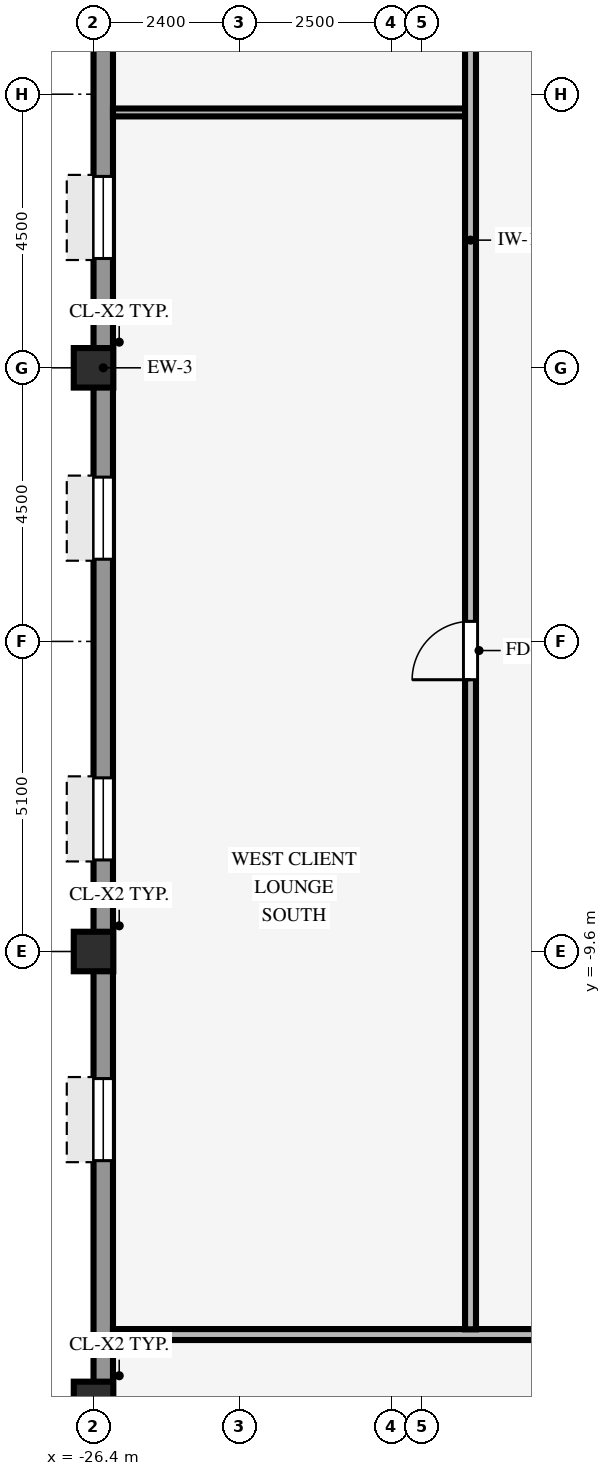
"""IFC4 building model, lengths in metres.
Left out: names, types, materials, properties, quantities, classifications, styles, units other than length and angle.
Written with IfcOpenShell. Run it as: python <this file> out.ifc"""

import sys

from ifc_helpers import new_model, si_unit, direction, frame, frame_2d, origin, origin_2d, place, context, subcontext, project, spatial, rectangle, hollow_rectangle, extrude, source, transform, mapped, element, fill, save


model = new_model("IFC4")
c1 = context("Model", 3, precision=1e-05, world=origin(), true_north=direction((0.0, 1.0)))
c2 = subcontext(c1, "Body", "Model", "MODEL_VIEW")
j1 = project(units=[si_unit("LENGTHUNIT", "METRE"), si_unit("PLANEANGLEUNIT", "RADIAN")], contexts=[c1])
p1 = place(None, origin())
s1 = spatial("IfcSite", under=j1, at=p1, CompositionType="ELEMENT")
p2 = place(p1, origin())
s2 = spatial("IfcBuilding", under=s1, at=p2, CompositionType="ELEMENT")
p3 = place(p2, frame((0.0, 0.0, 142.1)))
s3 = spatial("IfcBuildingStorey", under=s2, at=p3, CompositionType="ELEMENT", Elevation=142.1)
for number, where, z_axis, x_axis in (
    (1, (-26.4, -17.0, 0.0), (0.0, 0.0, 1.0), (1.0, 0.0, 0.0)),
    (2, (-26.4, -9.6, 0.0), (0.0, 0.0, 1.0), (1.0, 0.0, 0.0)),
    (3, (-26.4, 0.0, 0.0), (0.0, 0.0, 1.0), (1.0, 0.0, 0.0)),
):
    element("IfcColumn", number, at=place(p3, frame(where, z_axis=z_axis, x_axis=x_axis)), inside=s3, PredefinedType="COLUMN", context=c2, shape_type="SweptSolid", body=[
        extrude(hollow_rectangle(XDim=0.65, YDim=0.65, WallThickness=0.04, InnerFilletRadius=0.04, OuterFilletRadius=0.08, at=origin_2d()), origin(), (0.0, 0.0, 1.0), 3.37),
    ])
p4 = place(p3, frame((-26.24, -20.784, 0.0), z_axis=(0.0, 0.0, 1.0), x_axis=(0.0, 1.0, 0.0)))
e4 = element("IfcWall", 4, at=p4, inside=s3, PredefinedType="STANDARD", context=c2, shape_type="SweptSolid", body=[
    extrude(rectangle(XDim=41.568, YDim=0.32, at=frame_2d((20.784, 0.0))), origin(), (0.0, 0.0, 1.0), 2.705),
])
p5 = place(p4, frame((1.448, 0.0, 0.8)))
e5 = element("IfcOpeningElement", 5, at=p5, cuts=e4, PredefinedType="OPENING", context=c2, shape_type="SweptSolid", body=[
    extrude(rectangle(XDim=1.35, YDim=1.56, at=frame_2d((0.675, 0.78))), frame((0.0, 0.17, 0.0), z_axis=(0.0, -1.0, 0.0), x_axis=(1.0, 0.0, 0.0)), (0.0, 0.0, 1.0), 0.34),
])
p6 = place(p4, frame((7.744, 0.0, 0.8)))
e6 = element("IfcOpeningElement", 6, at=p6, cuts=e4, PredefinedType="OPENING", context=c2, shape_type="SweptSolid", body=[
    extrude(rectangle(XDim=1.35, YDim=1.56, at=frame_2d((0.675, 0.78))), frame((0.0, 0.17, 0.0), z_axis=(0.0, -1.0, 0.0), x_axis=(1.0, 0.0, 0.0)), (0.0, 0.0, 1.0), 0.34),
])
p7 = place(p4, frame((12.69, 0.0, 0.8)))
e7 = element("IfcOpeningElement", 7, at=p7, cuts=e4, PredefinedType="OPENING", context=c2, shape_type="SweptSolid", body=[
    extrude(rectangle(XDim=1.35, YDim=1.56, at=frame_2d((0.675, 0.78))), frame((0.0, 0.17, 0.0), z_axis=(0.0, -1.0, 0.0), x_axis=(1.0, 0.0, 0.0)), (0.0, 0.0, 1.0), 0.34),
])
p8 = place(p4, frame((17.636, 0.0, 0.8)))
e8 = element("IfcOpeningElement", 8, at=p8, cuts=e4, PredefinedType="OPENING", context=c2, shape_type="SweptSolid", body=[
    extrude(rectangle(XDim=1.35, YDim=1.56, at=frame_2d((0.675, 0.78))), frame((0.0, 0.17, 0.0), z_axis=(0.0, -1.0, 0.0), x_axis=(1.0, 0.0, 0.0)), (0.0, 0.0, 1.0), 0.34),
])
p9 = place(p4, frame((22.582, 0.0, 0.8)))
e9 = element("IfcOpeningElement", 9, at=p9, cuts=e4, PredefinedType="OPENING", context=c2, shape_type="SweptSolid", body=[
    extrude(rectangle(XDim=1.35, YDim=1.56, at=frame_2d((0.675, 0.78))), frame((0.0, 0.17, 0.0), z_axis=(0.0, -1.0, 0.0), x_axis=(1.0, 0.0, 0.0)), (0.0, 0.0, 1.0), 0.34),
])
p10 = place(p4, frame((27.528, 0.0, 0.8)))
e10 = element("IfcOpeningElement", 10, at=p10, cuts=e4, PredefinedType="OPENING", context=c2, shape_type="SweptSolid", body=[
    extrude(rectangle(XDim=1.35, YDim=1.56, at=frame_2d((0.675, 0.78))), frame((0.0, 0.17, 0.0), z_axis=(0.0, -1.0, 0.0), x_axis=(1.0, 0.0, 0.0)), (0.0, 0.0, 1.0), 0.34),
])
p11 = place(p4, frame((32.474, 0.0, 0.8)))
e11 = element("IfcOpeningElement", 11, at=p11, cuts=e4, PredefinedType="OPENING", context=c2, shape_type="SweptSolid", body=[
    extrude(rectangle(XDim=1.35, YDim=1.56, at=frame_2d((0.675, 0.78))), frame((0.0, 0.17, 0.0), z_axis=(0.0, -1.0, 0.0), x_axis=(1.0, 0.0, 0.0)), (0.0, 0.0, 1.0), 0.34),
])
p12 = place(p4, frame((38.77, 0.0, 0.8)))
e12 = element("IfcOpeningElement", 12, at=p12, cuts=e4, PredefinedType="OPENING", context=c2, shape_type="SweptSolid", body=[
    extrude(rectangle(XDim=1.35, YDim=1.56, at=frame_2d((0.675, 0.78))), frame((0.0, 0.17, 0.0), z_axis=(0.0, -1.0, 0.0), x_axis=(1.0, 0.0, 0.0)), (0.0, 0.0, 1.0), 0.34),
])
p13 = place(p3, frame((-26.08, -15.9, 0.0), z_axis=(0.0, 0.0, 1.0), x_axis=(1.0, 0.0, 0.0)))
e13 = element("IfcWall", 13, at=p13, inside=s3, PredefinedType="PARTITIONING", context=c2, shape_type="SweptSolid", body=[
    extrude(rectangle(XDim=52.16, YDim=0.18, at=frame_2d((26.08, 0.0))), origin(), (0.0, 0.0, 1.0), 3.36),
])
p14 = place(p13, frame((18.3, 0.0, 0.0)))
e14 = element("IfcOpeningElement", 14, at=p14, cuts=e13, PredefinedType="OPENING", context=c2, shape_type="SweptSolid", body=[
    extrude(rectangle(XDim=0.96, YDim=2.1, at=frame_2d((0.48, 1.05))), frame((0.0, 0.1, 0.0), z_axis=(0.0, -1.0, 0.0), x_axis=(1.0, 0.0, 0.0)), (0.0, 0.0, 1.0), 0.2),
])
p15 = place(p13, frame((40.5, 0.0, 0.0)))
e15 = element("IfcOpeningElement", 15, at=p15, cuts=e13, PredefinedType="OPENING", context=c2, shape_type="SweptSolid", body=[
    extrude(rectangle(XDim=0.96, YDim=2.1, at=frame_2d((0.48, 1.05))), frame((0.0, 0.1, 0.0), z_axis=(0.0, -1.0, 0.0), x_axis=(1.0, 0.0, 0.0)), (0.0, 0.0, 1.0), 0.2),
])
p16 = place(p3, frame((-26.08, 4.2, 0.0), z_axis=(0.0, 0.0, 1.0), x_axis=(1.0, 0.0, 0.0)))
e16 = element("IfcWall", 16, at=p16, inside=s3, PredefinedType="PARTITIONING", context=c2, shape_type="SweptSolid", body=[
    extrude(rectangle(XDim=5.794, YDim=0.13, at=frame_2d((2.897, 0.0))), origin(), (0.0, 0.0, 1.0), 3.36),
])
p17 = place(p3, frame((-20.2, -15.814, 0.0), z_axis=(0.0, 0.0, 1.0), x_axis=(0.0, 1.0, 0.0)))
e17 = element("IfcWall", 17, at=p17, inside=s3, PredefinedType="PARTITIONING", context=c2, shape_type="SweptSolid", body=[
    extrude(rectangle(XDim=31.628, YDim=0.18, at=frame_2d((15.814, 0.0))), origin(), (0.0, 0.0, 1.0), 3.36),
])
p18 = place(p17, frame((10.684, 0.0, 0.0)))
e18 = element("IfcOpeningElement", 18, at=p18, cuts=e17, PredefinedType="OPENING", context=c2, shape_type="SweptSolid", body=[
    extrude(rectangle(XDim=0.96, YDim=2.1, at=frame_2d((0.48, 1.05))), frame((0.0, 0.1, 0.0), z_axis=(0.0, -1.0, 0.0), x_axis=(1.0, 0.0, 0.0)), (0.0, 0.0, 1.0), 0.2),
])
p19 = place(p17, frame((24.184, 0.0, 0.0)))
e19 = element("IfcOpeningElement", 19, at=p19, cuts=e17, PredefinedType="OPENING", context=c2, shape_type="SweptSolid", body=[
    extrude(rectangle(XDim=0.96, YDim=2.1, at=frame_2d((0.48, 1.05))), frame((0.0, 0.1, 0.0), z_axis=(0.0, -1.0, 0.0), x_axis=(1.0, 0.0, 0.0)), (0.0, 0.0, 1.0), 0.2),
])
m1 = source(origin(), c2, "Body", "SweptSolid", [
    extrude(rectangle(XDim=1.35, YDim=1.56, at=frame_2d((0.675, 0.78))), frame((0.0, 0.03, 0.0), z_axis=(0.0, -1.0, 0.0), x_axis=(1.0, 0.0, 0.0)), (0.0, 0.0, 1.0), 0.06),
])
p20 = place(p6, origin())
e20 = element("IfcWindow", 20, at=p20, inside=s3, PartitioningType="SINGLE_PANEL", PredefinedType="WINDOW", context=c2, shape_type="MappedRepresentation", body=[
    mapped(m1, transform((0.0, 0.0, 0.0), scale=1.0)),
])
fill(e6, e20)
p21 = place(p7, origin())
e21 = element("IfcWindow", 21, at=p21, inside=s3, PartitioningType="SINGLE_PANEL", PredefinedType="WINDOW", context=c2, shape_type="MappedRepresentation", body=[
    mapped(m1, transform((0.0, 0.0, 0.0), scale=1.0)),
])
fill(e7, e21)
p22 = place(p8, origin())
e22 = element("IfcWindow", 22, at=p22, inside=s3, PartitioningType="SINGLE_PANEL", PredefinedType="WINDOW", context=c2, shape_type="MappedRepresentation", body=[
    mapped(m1, transform((0.0, 0.0, 0.0), scale=1.0)),
])
fill(e8, e22)
p23 = place(p9, origin())
e23 = element("IfcWindow", 23, at=p23, inside=s3, PartitioningType="SINGLE_PANEL", PredefinedType="WINDOW", context=c2, shape_type="MappedRepresentation", body=[
    mapped(m1, transform((0.0, 0.0, 0.0), scale=1.0)),
])
fill(e9, e23)
m2 = source(origin(), c2, "Body", "SweptSolid", [
    extrude(rectangle(XDim=0.96, YDim=2.1, at=frame_2d((0.48, 1.05))), frame((0.0, 0.025, 0.0), z_axis=(0.0, -1.0, 0.0), x_axis=(1.0, 0.0, 0.0)), (0.0, 0.0, 1.0), 0.05),
])
p24 = place(p18, origin())
e24 = element("IfcDoor", 24, at=p24, inside=s3, OperationType="SINGLE_SWING_LEFT", PredefinedType="DOOR", context=c2, shape_type="MappedRepresentation", body=[
    mapped(m2, transform((0.0, 0.0, 0.0), scale=1.0)),
])
fill(e18, e24)
save(model, sys.argv[1])
